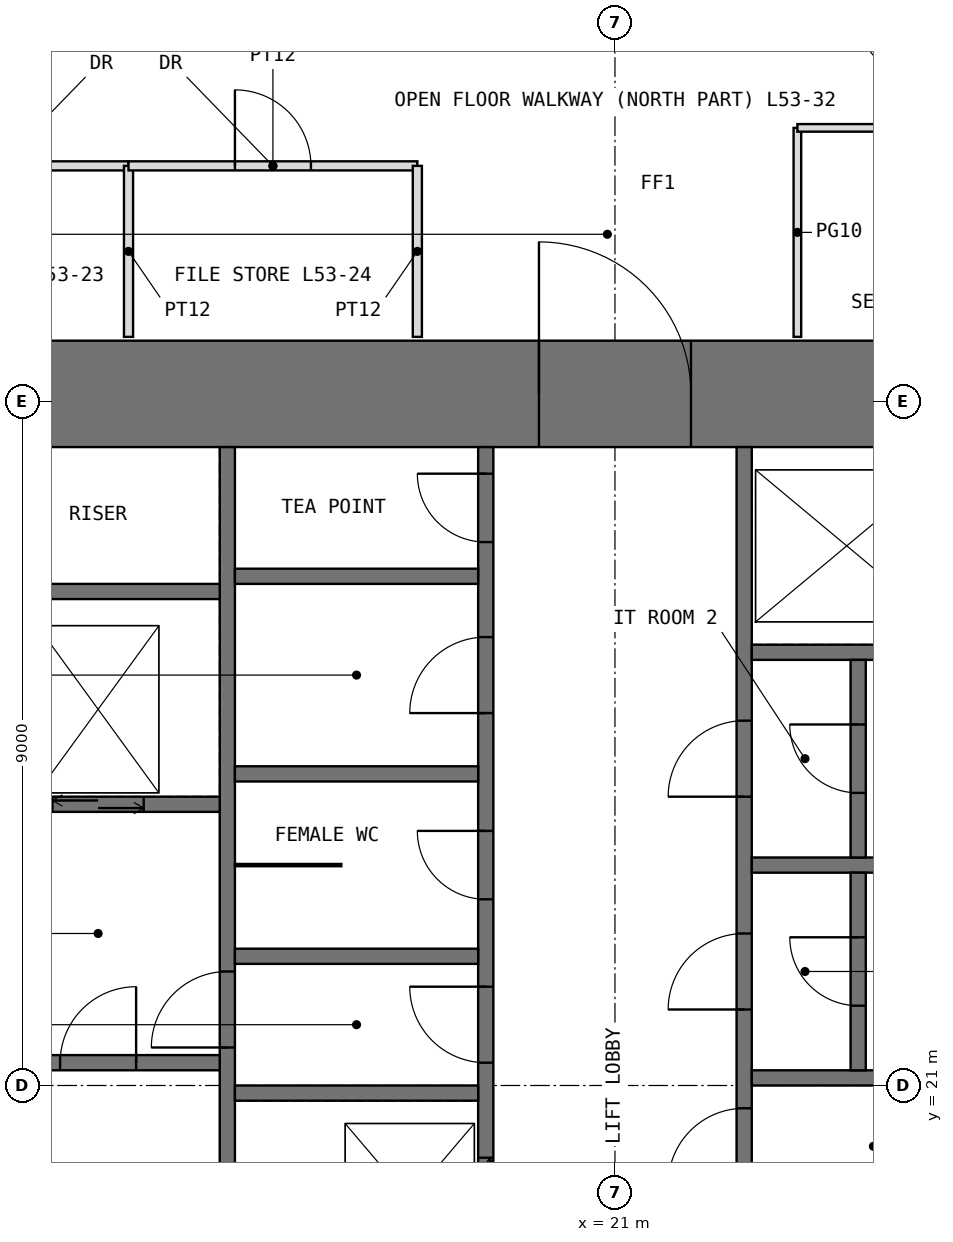
"""IFC4 building model, lengths in metres.
Left out: names, types, materials, properties, quantities, classifications, styles, units other than length and angle.
Written with IfcOpenShell. Run it as: python <this file> out.ifc"""

import sys

from ifc_helpers import new_model, si_unit, direction, frame, frame_2d, origin, place, context, subcontext, project, spatial, rectangle, extrude, element, fill, save


model = new_model("IFC4")
c1 = context("Model", 3, precision=1e-05, world=origin(), true_north=direction((0.0, 1.0)))
c2 = subcontext(c1, "Body", "Model", "MODEL_VIEW")
j1 = project(units=[si_unit("LENGTHUNIT", "METRE"), si_unit("PLANEANGLEUNIT", "RADIAN")], contexts=[c1])
p1 = place(None, origin())
s1 = spatial("IfcSite", under=j1, at=p1, CompositionType="ELEMENT")
p2 = place(p1, origin())
s2 = spatial("IfcBuilding", under=s1, at=p2, CompositionType="ELEMENT")
p3 = place(p2, frame((0.0, 0.0, 222.5)))
s3 = spatial("IfcBuildingStorey", under=s2, at=p3, CompositionType="ELEMENT", Elevation=222.5)
p4 = place(p3, frame((11.2, 30.1, -0.05), z_axis=(0.0, 0.0, 1.0), x_axis=(1.0, 0.0, 0.0)))
e1 = element("IfcWall", 1, at=p4, inside=s3, PredefinedType="SHEAR", context=c2, shape_type="SweptSolid", body=[
    extrude(rectangle(XDim=19.6, YDim=1.4, at=frame_2d((9.8, 0.0))), origin(), (0.0, 0.0, 1.0), 4.0),
])
p5 = place(p4, frame((8.8, 0.0, 0.05)))
e2 = element("IfcOpeningElement", 2, at=p5, cuts=e1, PredefinedType="OPENING", context=c2, shape_type="SweptSolid", body=[
    extrude(rectangle(XDim=2.0, YDim=2.2, at=frame_2d((1.0, 1.1))), frame((0.0, 0.71, 0.0), z_axis=(0.0, -1.0, 0.0), x_axis=(1.0, 0.0, 0.0)), (0.0, 0.0, 1.0), 1.42),
])
p6 = place(p3, frame((15.9, 12.6, -0.05), z_axis=(0.0, 0.0, 1.0), x_axis=(0.0, 1.0, 0.0)))
e3 = element("IfcWall", 3, at=p6, inside=s3, PredefinedType="SHEAR", context=c2, shape_type="SweptSolid", body=[
    extrude(rectangle(XDim=16.8, YDim=0.2, at=frame_2d((8.4, 0.0))), origin(), (0.0, 0.0, 1.0), 4.0),
])
p7 = place(p6, frame((8.9, 0.0, 0.05)))
e4 = element("IfcOpeningElement", 4, at=p7, cuts=e3, PredefinedType="OPENING", context=c2, shape_type="SweptSolid", body=[
    extrude(rectangle(XDim=1.0, YDim=2.2, at=frame_2d((0.5, 1.1))), frame((0.0, 0.11, 0.0), z_axis=(0.0, -1.0, 0.0), x_axis=(1.0, 0.0, 0.0)), (0.0, 0.0, 1.0), 0.22),
])
p8 = place(p3, frame((19.3, 12.6, -0.05), z_axis=(0.0, 0.0, 1.0), x_axis=(0.0, 1.0, 0.0)))
e5 = element("IfcWall", 5, at=p8, inside=s3, PredefinedType="SHEAR", context=c2, shape_type="SweptSolid", body=[
    extrude(rectangle(XDim=16.8, YDim=0.2, at=frame_2d((8.4, 0.0))), origin(), (0.0, 0.0, 1.0), 4.0),
])
p9 = place(p8, frame((8.7, 0.0, 0.05)))
e6 = element("IfcOpeningElement", 6, at=p9, cuts=e5, PredefinedType="OPENING", context=c2, shape_type="SweptSolid", body=[
    extrude(rectangle(XDim=1.0, YDim=2.2, at=frame_2d((0.5, 1.1))), frame((0.0, 0.11, 0.0), z_axis=(0.0, -1.0, 0.0), x_axis=(1.0, 0.0, 0.0)), (0.0, 0.0, 1.0), 0.22),
])
p10 = place(p8, frame((10.85, 0.0, 0.05)))
e7 = element("IfcOpeningElement", 7, at=p10, cuts=e5, PredefinedType="OPENING", context=c2, shape_type="SweptSolid", body=[
    extrude(rectangle(XDim=0.9, YDim=2.2, at=frame_2d((0.45, 1.1))), frame((0.0, 0.11, 0.0), z_axis=(0.0, -1.0, 0.0), x_axis=(1.0, 0.0, 0.0)), (0.0, 0.0, 1.0), 0.22),
])
p11 = place(p8, frame((13.3, 0.0, 0.05)))
e8 = element("IfcOpeningElement", 8, at=p11, cuts=e5, PredefinedType="OPENING", context=c2, shape_type="SweptSolid", body=[
    extrude(rectangle(XDim=1.0, YDim=2.2, at=frame_2d((0.5, 1.1))), frame((0.0, 0.11, 0.0), z_axis=(0.0, -1.0, 0.0), x_axis=(1.0, 0.0, 0.0)), (0.0, 0.0, 1.0), 0.22),
])
p12 = place(p8, frame((15.55, 0.0, 0.05)))
e9 = element("IfcOpeningElement", 9, at=p12, cuts=e5, PredefinedType="OPENING", context=c2, shape_type="SweptSolid", body=[
    extrude(rectangle(XDim=0.9, YDim=2.2, at=frame_2d((0.45, 1.1))), frame((0.0, 0.11, 0.0), z_axis=(0.0, -1.0, 0.0), x_axis=(1.0, 0.0, 0.0)), (0.0, 0.0, 1.0), 0.22),
])
p13 = place(p8, frame((0.75, 0.0, 0.05)))
e10 = element("IfcOpeningElement", 10, at=p13, cuts=e5, PredefinedType="OPENING", context=c2, shape_type="SweptSolid", body=[
    extrude(rectangle(XDim=1.1, YDim=2.2, at=frame_2d((0.55, 1.1))), frame((0.0, 0.11, 0.0), z_axis=(0.0, -1.0, 0.0), x_axis=(1.0, 0.0, 0.0)), (0.0, 0.0, 1.0), 0.22),
])
p14 = place(p8, frame((3.55, 0.0, 0.05)))
e11 = element("IfcOpeningElement", 11, at=p14, cuts=e5, PredefinedType="OPENING", context=c2, shape_type="SweptSolid", body=[
    extrude(rectangle(XDim=1.1, YDim=2.2, at=frame_2d((0.55, 1.1))), frame((0.0, 0.11, 0.0), z_axis=(0.0, -1.0, 0.0), x_axis=(1.0, 0.0, 0.0)), (0.0, 0.0, 1.0), 0.22),
])
p15 = place(p8, frame((6.35, 0.0, 0.05)))
e12 = element("IfcOpeningElement", 12, at=p15, cuts=e5, PredefinedType="OPENING", context=c2, shape_type="SweptSolid", body=[
    extrude(rectangle(XDim=1.1, YDim=2.2, at=frame_2d((0.55, 1.1))), frame((0.0, 0.11, 0.0), z_axis=(0.0, -1.0, 0.0), x_axis=(1.0, 0.0, 0.0)), (0.0, 0.0, 1.0), 0.22),
])
p16 = place(p3, frame((22.7, 12.6, -0.05), z_axis=(0.0, 0.0, 1.0), x_axis=(0.0, 1.0, 0.0)))
e13 = element("IfcWall", 13, at=p16, inside=s3, PredefinedType="SHEAR", context=c2, shape_type="SweptSolid", body=[
    extrude(rectangle(XDim=16.8, YDim=0.2, at=frame_2d((8.4, 0.0))), origin(), (0.0, 0.0, 1.0), 4.0),
])
p17 = place(p16, frame((0.45, 0.0, 0.05)))
e14 = element("IfcOpeningElement", 14, at=p17, cuts=e13, PredefinedType="OPENING", context=c2, shape_type="SweptSolid", body=[
    extrude(rectangle(XDim=0.9, YDim=2.2, at=frame_2d((0.45, 1.1))), frame((0.0, 0.11, 0.0), z_axis=(0.0, -1.0, 0.0), x_axis=(1.0, 0.0, 0.0)), (0.0, 0.0, 1.0), 0.22),
])
p18 = place(p16, frame((7.1, 0.0, 0.05)))
e15 = element("IfcOpeningElement", 15, at=p18, cuts=e13, PredefinedType="OPENING", context=c2, shape_type="SweptSolid", body=[
    extrude(rectangle(XDim=1.0, YDim=2.2, at=frame_2d((0.5, 1.1))), frame((0.0, 0.11, 0.0), z_axis=(0.0, -1.0, 0.0), x_axis=(1.0, 0.0, 0.0)), (0.0, 0.0, 1.0), 0.22),
])
p19 = place(p16, frame((1.95, 0.0, 0.05)))
e16 = element("IfcOpeningElement", 16, at=p19, cuts=e13, PredefinedType="OPENING", context=c2, shape_type="SweptSolid", body=[
    extrude(rectangle(XDim=0.9, YDim=2.2, at=frame_2d((0.45, 1.1))), frame((0.0, 0.11, 0.0), z_axis=(0.0, -1.0, 0.0), x_axis=(1.0, 0.0, 0.0)), (0.0, 0.0, 1.0), 0.22),
])
p20 = place(p16, frame((4.95, 0.0, 0.05)))
e17 = element("IfcOpeningElement", 17, at=p20, cuts=e13, PredefinedType="OPENING", context=c2, shape_type="SweptSolid", body=[
    extrude(rectangle(XDim=0.9, YDim=2.2, at=frame_2d((0.45, 1.1))), frame((0.0, 0.11, 0.0), z_axis=(0.0, -1.0, 0.0), x_axis=(1.0, 0.0, 0.0)), (0.0, 0.0, 1.0), 0.22),
])
p21 = place(p16, frame((9.4, 0.0, 0.05)))
e18 = element("IfcOpeningElement", 18, at=p21, cuts=e13, PredefinedType="OPENING", context=c2, shape_type="SweptSolid", body=[
    extrude(rectangle(XDim=1.0, YDim=2.2, at=frame_2d((0.5, 1.1))), frame((0.0, 0.11, 0.0), z_axis=(0.0, -1.0, 0.0), x_axis=(1.0, 0.0, 0.0)), (0.0, 0.0, 1.0), 0.22),
])
p22 = place(p16, frame((12.2, 0.0, 0.05)))
e19 = element("IfcOpeningElement", 19, at=p22, cuts=e13, PredefinedType="OPENING", context=c2, shape_type="SweptSolid", body=[
    extrude(rectangle(XDim=1.0, YDim=2.2, at=frame_2d((0.5, 1.1))), frame((0.0, 0.11, 0.0), z_axis=(0.0, -1.0, 0.0), x_axis=(1.0, 0.0, 0.0)), (0.0, 0.0, 1.0), 0.22),
])
p23 = place(p3, frame((12.6, 21.3, -0.05), z_axis=(0.0, 0.0, 1.0), x_axis=(1.0, 0.0, 0.0)))
e20 = element("IfcWall", 20, at=p23, inside=s3, PredefinedType="SHEAR", context=c2, shape_type="SweptSolid", body=[
    extrude(rectangle(XDim=3.2, YDim=0.2, at=frame_2d((1.6, 0.0))), origin(), (0.0, 0.0, 1.0), 4.0),
])
p24 = place(p23, frame((1.1, 0.0, 0.05)))
e21 = element("IfcOpeningElement", 21, at=p24, cuts=e20, PredefinedType="OPENING", context=c2, shape_type="SweptSolid", body=[
    extrude(rectangle(XDim=1.0, YDim=2.2, at=frame_2d((0.5, 1.1))), frame((0.0, 0.11, 0.0), z_axis=(0.0, -1.0, 0.0), x_axis=(1.0, 0.0, 0.0)), (0.0, 0.0, 1.0), 0.22),
])
p25 = place(p3, frame((12.6, 24.7, -0.05), z_axis=(0.0, 0.0, 1.0), x_axis=(1.0, 0.0, 0.0)))
e22 = element("IfcWall", 22, at=p25, inside=s3, PredefinedType="SHEAR", context=c2, shape_type="SweptSolid", body=[
    extrude(rectangle(XDim=3.2, YDim=0.2, at=frame_2d((1.6, 0.0))), origin(), (0.0, 0.0, 1.0), 4.0),
])
p26 = place(p25, frame((1.0, 0.0, 0.05)))
e23 = element("IfcOpeningElement", 23, at=p26, cuts=e22, PredefinedType="OPENING", context=c2, shape_type="SweptSolid", body=[
    extrude(rectangle(XDim=1.2, YDim=2.2, at=frame_2d((0.6, 1.1))), frame((0.0, 0.11, 0.0), z_axis=(0.0, -1.0, 0.0), x_axis=(1.0, 0.0, 0.0)), (0.0, 0.0, 1.0), 0.22),
])
for number, where, z_axis, x_axis in (
    (24, (12.6, 27.5, -0.05), (0.0, 0.0, 1.0), (1.0, 0.0, 0.0)),
    (25, (16.0, 20.9, -0.05), (0.0, 0.0, 1.0), (1.0, 0.0, 0.0)),
    (26, (16.0, 22.7, -0.05), (0.0, 0.0, 1.0), (1.0, 0.0, 0.0)),
    (27, (16.0, 25.1, -0.05), (0.0, 0.0, 1.0), (1.0, 0.0, 0.0)),
    (28, (16.0, 27.7, -0.05), (0.0, 0.0, 1.0), (1.0, 0.0, 0.0)),
    (29, (22.8, 21.1, -0.05), (0.0, 0.0, 1.0), (1.0, 0.0, 0.0)),
    (30, (22.8, 23.9, -0.05), (0.0, 0.0, 1.0), (1.0, 0.0, 0.0)),
    (31, (22.8, 26.7, -0.05), (0.0, 0.0, 1.0), (1.0, 0.0, 0.0)),
):
    element("IfcWall", number, at=place(p3, frame(where, z_axis=z_axis, x_axis=x_axis)), inside=s3, PredefinedType="SHEAR", context=c2, shape_type="SweptSolid", body=[
        extrude(rectangle(XDim=3.2, YDim=0.2, at=frame_2d((1.6, 0.0))), origin(), (0.0, 0.0, 1.0), 4.0),
    ])
p27 = place(p3, frame((16.0, 23.9, 0.0), z_axis=(0.0, 0.0, 1.0), x_axis=(1.0, 0.0, 0.0)))
e32 = element("IfcWall", 32, at=p27, inside=s3, PredefinedType="PARTITIONING", context=c2, shape_type="SweptSolid", body=[
    extrude(rectangle(XDim=1.4, YDim=0.03, at=frame_2d((0.7, 0.0))), origin(), (0.0, 0.0, 1.0), 3.75),
])
p28 = place(p3, frame((24.2, 21.2, -0.05), z_axis=(0.0, 0.0, 1.0), x_axis=(0.0, 1.0, 0.0)))
e33 = element("IfcWall", 33, at=p28, inside=s3, PredefinedType="SHEAR", context=c2, shape_type="SweptSolid", body=[
    extrude(rectangle(XDim=2.6, YDim=0.2, at=frame_2d((1.3, 0.0))), origin(), (0.0, 0.0, 1.0), 4.0),
])
p29 = place(p28, frame((0.85, 0.0, 0.05)))
e34 = element("IfcOpeningElement", 34, at=p29, cuts=e33, PredefinedType="OPENING", context=c2, shape_type="SweptSolid", body=[
    extrude(rectangle(XDim=0.9, YDim=2.2, at=frame_2d((0.45, 1.1))), frame((0.0, 0.11, 0.0), z_axis=(0.0, -1.0, 0.0), x_axis=(1.0, 0.0, 0.0)), (0.0, 0.0, 1.0), 0.22),
])
p30 = place(p3, frame((24.2, 24.0, -0.05), z_axis=(0.0, 0.0, 1.0), x_axis=(0.0, 1.0, 0.0)))
e35 = element("IfcWall", 35, at=p30, inside=s3, PredefinedType="SHEAR", context=c2, shape_type="SweptSolid", body=[
    extrude(rectangle(XDim=2.6, YDim=0.2, at=frame_2d((1.3, 0.0))), origin(), (0.0, 0.0, 1.0), 4.0),
])
p31 = place(p30, frame((0.85, 0.0, 0.05)))
e36 = element("IfcOpeningElement", 36, at=p31, cuts=e35, PredefinedType="OPENING", context=c2, shape_type="SweptSolid", body=[
    extrude(rectangle(XDim=0.9, YDim=2.2, at=frame_2d((0.45, 1.1))), frame((0.0, 0.11, 0.0), z_axis=(0.0, -1.0, 0.0), x_axis=(1.0, 0.0, 0.0)), (0.0, 0.0, 1.0), 0.22),
])
p32 = place(p3, frame((11.2, 33.1, 0.0), z_axis=(0.0, 0.0, 1.0), x_axis=(1.0, 0.0, 0.0)))
e37 = element("IfcWall", 37, at=p32, inside=s3, PredefinedType="PARTITIONING", context=c2, shape_type="SweptSolid", body=[
    extrude(rectangle(XDim=3.4, YDim=0.12, at=frame_2d((1.7, 0.0))), origin(), (0.0, 0.0, 1.0), 3.75),
])
p33 = place(p32, frame((1.2, 0.0, 0.0)))
e38 = element("IfcOpeningElement", 38, at=p33, cuts=e37, PredefinedType="OPENING", context=c2, shape_type="SweptSolid", body=[
    extrude(rectangle(XDim=1.0, YDim=2.2, at=frame_2d((0.5, 1.1))), frame((0.0, 0.07, 0.0), z_axis=(0.0, -1.0, 0.0), x_axis=(1.0, 0.0, 0.0)), (0.0, 0.0, 1.0), 0.14),
])
p34 = place(p3, frame((14.6, 30.85, 0.0), z_axis=(0.0, 0.0, 1.0), x_axis=(0.0, 1.0, 0.0)))
e39 = element("IfcWall", 39, at=p34, inside=s3, PredefinedType="PARTITIONING", context=c2, shape_type="SweptSolid", body=[
    extrude(rectangle(XDim=2.25, YDim=0.12, at=frame_2d((1.125, 0.0))), origin(), (0.0, 0.0, 1.0), 3.75),
])
p35 = place(p3, frame((14.6, 33.1, 0.0), z_axis=(0.0, 0.0, 1.0), x_axis=(1.0, 0.0, 0.0)))
e40 = element("IfcWall", 40, at=p35, inside=s3, PredefinedType="PARTITIONING", context=c2, shape_type="SweptSolid", body=[
    extrude(rectangle(XDim=3.8, YDim=0.12, at=frame_2d((1.9, 0.0))), origin(), (0.0, 0.0, 1.0), 3.75),
])
p36 = place(p35, frame((1.4, 0.0, 0.0)))
e41 = element("IfcOpeningElement", 41, at=p36, cuts=e40, PredefinedType="OPENING", context=c2, shape_type="SweptSolid", body=[
    extrude(rectangle(XDim=1.0, YDim=2.2, at=frame_2d((0.5, 1.1))), frame((0.0, 0.07, 0.0), z_axis=(0.0, -1.0, 0.0), x_axis=(1.0, 0.0, 0.0)), (0.0, 0.0, 1.0), 0.14),
])
p37 = place(p3, frame((18.4, 30.85, 0.0), z_axis=(0.0, 0.0, 1.0), x_axis=(0.0, 1.0, 0.0)))
e42 = element("IfcWall", 42, at=p37, inside=s3, PredefinedType="PARTITIONING", context=c2, shape_type="SweptSolid", body=[
    extrude(rectangle(XDim=2.25, YDim=0.12, at=frame_2d((1.125, 0.0))), origin(), (0.0, 0.0, 1.0), 3.75),
])
p38 = place(p3, frame((23.4, 30.85, 0.0), z_axis=(0.0, 0.0, 1.0), x_axis=(0.0, 1.0, 0.0)))
e43 = element("IfcWall", 43, at=p38, inside=s3, PredefinedType="PARTITIONING", context=c2, shape_type="SweptSolid", body=[
    extrude(rectangle(XDim=2.75, YDim=0.1, at=frame_2d((1.375, 0.0))), origin(), (0.0, 0.0, 1.0), 3.75),
])
p39 = place(p3, frame((23.4, 33.6, 0.0), z_axis=(0.0, 0.0, 1.0), x_axis=(1.0, 0.0, 0.0)))
e44 = element("IfcWall", 44, at=p39, inside=s3, PredefinedType="PARTITIONING", context=c2, shape_type="SweptSolid", body=[
    extrude(rectangle(XDim=3.6, YDim=0.1, at=frame_2d((1.8, 0.0))), origin(), (0.0, 0.0, 1.0), 3.75),
])
p40 = place(p39, frame((1.3, 0.0, 0.0)))
e45 = element("IfcOpeningElement", 45, at=p40, cuts=e44, PredefinedType="OPENING", context=c2, shape_type="SweptSolid", body=[
    extrude(rectangle(XDim=1.0, YDim=2.4, at=frame_2d((0.5, 1.2))), frame((0.0, 0.06, 0.0), z_axis=(0.0, -1.0, 0.0), x_axis=(1.0, 0.0, 0.0)), (0.0, 0.0, 1.0), 0.12),
])
p41 = place(p5, origin())
e46 = element("IfcDoor", 46, at=p41, inside=s3, OperationType="DOUBLE_DOOR_SINGLE_SWING", PredefinedType="DOOR", context=c2, shape_type="SweptSolid", body=[
    extrude(rectangle(XDim=2.0, YDim=2.2, at=frame_2d((1.0, 1.1))), frame((0.0, 0.025, 0.0), z_axis=(0.0, -1.0, 0.0), x_axis=(1.0, 0.0, 0.0)), (0.0, 0.0, 1.0), 0.05),
])
fill(e2, e46)
p42 = place(p24, origin())
e47 = element("IfcDoor", 47, at=p42, inside=s3, OperationType="SINGLE_SWING_RIGHT", PredefinedType="DOOR", context=c2, shape_type="SweptSolid", body=[
    extrude(rectangle(XDim=1.0, YDim=2.2, at=frame_2d((0.5, 1.1))), frame((0.0, 0.025, 0.0), z_axis=(0.0, -1.0, 0.0), x_axis=(1.0, 0.0, 0.0)), (0.0, 0.0, 1.0), 0.05),
])
fill(e21, e47)
p43 = place(p7, origin())
e48 = element("IfcDoor", 48, at=p43, inside=s3, OperationType="SINGLE_SWING_LEFT", PredefinedType="DOOR", context=c2, shape_type="SweptSolid", body=[
    extrude(rectangle(XDim=1.0, YDim=2.2, at=frame_2d((0.5, 1.1))), frame((0.0, 0.025, 0.0), z_axis=(0.0, -1.0, 0.0), x_axis=(1.0, 0.0, 0.0)), (0.0, 0.0, 1.0), 0.05),
])
fill(e4, e48)
p44 = place(p9, origin())
e49 = element("IfcDoor", 49, at=p44, inside=s3, OperationType="SINGLE_SWING_RIGHT", PredefinedType="DOOR", context=c2, shape_type="SweptSolid", body=[
    extrude(rectangle(XDim=1.0, YDim=2.2, at=frame_2d((0.5, 1.1))), frame((0.0, 0.025, 0.0), z_axis=(0.0, -1.0, 0.0), x_axis=(1.0, 0.0, 0.0)), (0.0, 0.0, 1.0), 0.05),
])
fill(e6, e49)
p45 = place(p18, origin())
e50 = element("IfcDoor", 50, at=p45, inside=s3, OperationType="SINGLE_SWING_LEFT", PredefinedType="DOOR", context=c2, shape_type="SweptSolid", body=[
    extrude(rectangle(XDim=1.0, YDim=2.2, at=frame_2d((0.5, 1.1))), frame((0.0, 0.025, 0.0), z_axis=(0.0, -1.0, 0.0), x_axis=(1.0, 0.0, 0.0)), (0.0, 0.0, 1.0), 0.05),
])
fill(e15, e50)
p46 = place(p10, origin())
e51 = element("IfcDoor", 51, at=p46, inside=s3, OperationType="SINGLE_SWING_RIGHT", PredefinedType="DOOR", context=c2, shape_type="SweptSolid", body=[
    extrude(rectangle(XDim=0.9, YDim=2.2, at=frame_2d((0.45, 1.1))), frame((0.0, 0.025, 0.0), z_axis=(0.0, -1.0, 0.0), x_axis=(1.0, 0.0, 0.0)), (0.0, 0.0, 1.0), 0.05),
])
fill(e7, e51)
p47 = place(p11, origin())
e52 = element("IfcDoor", 52, at=p47, inside=s3, OperationType="SINGLE_SWING_LEFT", PredefinedType="DOOR", context=c2, shape_type="SweptSolid", body=[
    extrude(rectangle(XDim=1.0, YDim=2.2, at=frame_2d((0.5, 1.1))), frame((0.0, 0.025, 0.0), z_axis=(0.0, -1.0, 0.0), x_axis=(1.0, 0.0, 0.0)), (0.0, 0.0, 1.0), 0.05),
])
fill(e8, e52)
p48 = place(p12, origin())
e53 = element("IfcDoor", 53, at=p48, inside=s3, OperationType="SINGLE_SWING_RIGHT", PredefinedType="DOOR", context=c2, shape_type="SweptSolid", body=[
    extrude(rectangle(XDim=0.9, YDim=2.2, at=frame_2d((0.45, 1.1))), frame((0.0, 0.025, 0.0), z_axis=(0.0, -1.0, 0.0), x_axis=(1.0, 0.0, 0.0)), (0.0, 0.0, 1.0), 0.05),
])
fill(e9, e53)
p49 = place(p21, origin())
e54 = element("IfcDoor", 54, at=p49, inside=s3, OperationType="SINGLE_SWING_LEFT", PredefinedType="DOOR", context=c2, shape_type="SweptSolid", body=[
    extrude(rectangle(XDim=1.0, YDim=2.2, at=frame_2d((0.5, 1.1))), frame((0.0, 0.025, 0.0), z_axis=(0.0, -1.0, 0.0), x_axis=(1.0, 0.0, 0.0)), (0.0, 0.0, 1.0), 0.05),
])
fill(e18, e54)
p50 = place(p29, origin())
e55 = element("IfcDoor", 55, at=p50, inside=s3, OperationType="SINGLE_SWING_RIGHT", PredefinedType="DOOR", context=c2, shape_type="SweptSolid", body=[
    extrude(rectangle(XDim=0.9, YDim=2.2, at=frame_2d((0.45, 1.1))), frame((0.0, 0.025, 0.0), z_axis=(0.0, -1.0, 0.0), x_axis=(1.0, 0.0, 0.0)), (0.0, 0.0, 1.0), 0.05),
])
fill(e34, e55)
p51 = place(p22, origin())
e56 = element("IfcDoor", 56, at=p51, inside=s3, OperationType="SINGLE_SWING_LEFT", PredefinedType="DOOR", context=c2, shape_type="SweptSolid", body=[
    extrude(rectangle(XDim=1.0, YDim=2.2, at=frame_2d((0.5, 1.1))), frame((0.0, 0.025, 0.0), z_axis=(0.0, -1.0, 0.0), x_axis=(1.0, 0.0, 0.0)), (0.0, 0.0, 1.0), 0.05),
])
fill(e19, e56)
p52 = place(p31, origin())
e57 = element("IfcDoor", 57, at=p52, inside=s3, OperationType="SINGLE_SWING_RIGHT", PredefinedType="DOOR", context=c2, shape_type="SweptSolid", body=[
    extrude(rectangle(XDim=0.9, YDim=2.2, at=frame_2d((0.45, 1.1))), frame((0.0, 0.025, 0.0), z_axis=(0.0, -1.0, 0.0), x_axis=(1.0, 0.0, 0.0)), (0.0, 0.0, 1.0), 0.05),
])
fill(e36, e57)
p53 = place(p36, origin())
e58 = element("IfcDoor", 58, at=p53, inside=s3, OperationType="SINGLE_SWING_LEFT", PredefinedType="DOOR", context=c2, shape_type="SweptSolid", body=[
    extrude(rectangle(XDim=1.0, YDim=2.2, at=frame_2d((0.5, 1.1))), frame((0.0, 0.025, 0.0), z_axis=(0.0, -1.0, 0.0), x_axis=(1.0, 0.0, 0.0)), (0.0, 0.0, 1.0), 0.05),
])
fill(e41, e58)
p54 = place(p15, origin())
e59 = element("IfcDoor", 59, at=p54, inside=s3, OperationType="DOUBLE_DOOR_SLIDING", PredefinedType="DOOR", context=c2, shape_type="SweptSolid", body=[
    extrude(rectangle(XDim=1.1, YDim=2.2, at=frame_2d((0.55, 1.1))), frame((0.0, 0.025, 0.0), z_axis=(0.0, -1.0, 0.0), x_axis=(1.0, 0.0, 0.0)), (0.0, 0.0, 1.0), 0.05),
])
fill(e12, e59)
p55 = place(p26, origin())
e60 = element("IfcDoor", 60, at=p55, inside=s3, OperationType="DOUBLE_DOOR_SLIDING", PredefinedType="DOOR", context=c2, shape_type="SweptSolid", body=[
    extrude(rectangle(XDim=1.2, YDim=2.2, at=frame_2d((0.6, 1.1))), frame((0.0, 0.025, 0.0), z_axis=(0.0, -1.0, 0.0), x_axis=(1.0, 0.0, 0.0)), (0.0, 0.0, 1.0), 0.05),
])
fill(e23, e60)
save(model, sys.argv[1])
